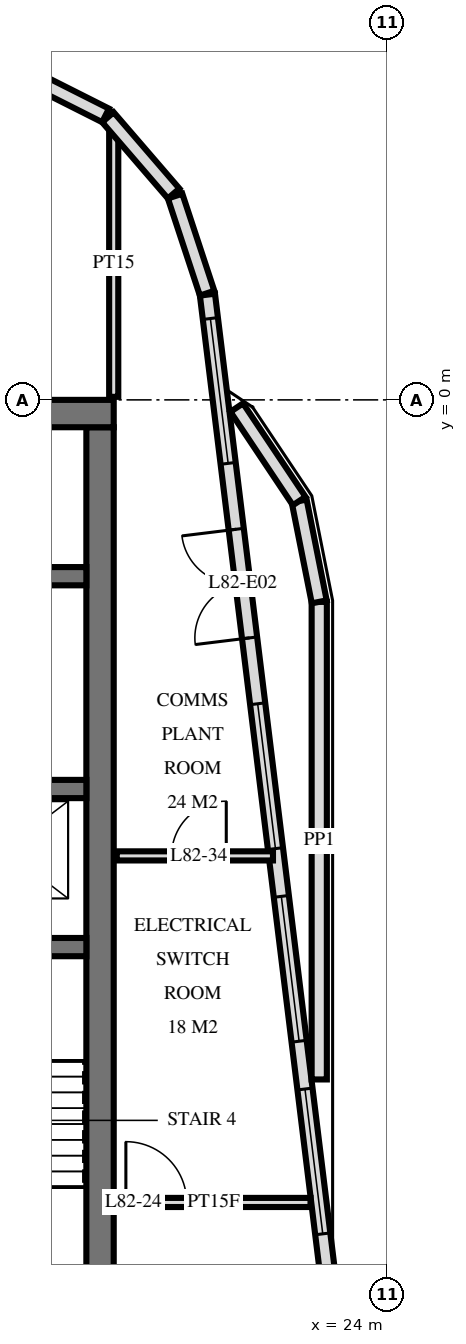
"""IFC4 building model, lengths in metres.
Left out: names, types, materials, properties, quantities, classifications, styles, units other than length and angle.
Written with IfcOpenShell. Run it as: python <this file> out.ifc"""

import sys

from ifc_helpers import new_model, si_unit, direction, frame, frame_2d, origin, place, context, subcontext, project, spatial, rectangle, extrude, element, fill, save


model = new_model("IFC4")
c1 = context("Model", 3, precision=1e-05, world=origin(), true_north=direction((0.0, 1.0)))
c2 = subcontext(c1, "Body", "Model", "MODEL_VIEW")
j1 = project(units=[si_unit("LENGTHUNIT", "METRE"), si_unit("PLANEANGLEUNIT", "RADIAN")], contexts=[c1])
p1 = place(None, origin())
s1 = spatial("IfcSite", under=j1, at=p1, CompositionType="ELEMENT")
p2 = place(p1, origin())
s2 = spatial("IfcBuilding", under=s1, at=p2, CompositionType="ELEMENT")
p3 = place(p2, frame((0.0, 0.0, 308.6)))
s3 = spatial("IfcBuildingStorey", under=s2, at=p3, CompositionType="ELEMENT", Elevation=308.6)
p4 = place(p3, frame((10.0, -0.225, 0.0), z_axis=(0.0, 0.0, 1.0), x_axis=(1.0, 0.0, 0.0)))
e1 = element("IfcWall", 1, at=p4, inside=s3, PredefinedType="SHEAR", context=c2, shape_type="SweptSolid", body=[
    extrude(rectangle(XDim=9.5, YDim=0.45, at=frame_2d((4.75, 0.0))), origin(), (0.0, 0.0, 1.0), 6.0),
])
p5 = place(p3, frame((19.275, -14.55, 0.0), z_axis=(0.0, 0.0, 1.0), x_axis=(0.0, 1.0, 0.0)))
e2 = element("IfcWall", 2, at=p5, inside=s3, PredefinedType="SHEAR", context=c2, shape_type="SweptSolid", body=[
    extrude(rectangle(XDim=14.1, YDim=0.45, at=frame_2d((7.05, 0.0))), origin(), (0.0, 0.0, 1.0), 6.0),
])
p6 = place(p3, frame((10.35, -2.9, 0.0), z_axis=(0.0, 0.0, 1.0), x_axis=(1.0, 0.0, 0.0)))
e3 = element("IfcWall", 3, at=p6, inside=s3, PredefinedType="SHEAR", context=c2, shape_type="SweptSolid", body=[
    extrude(rectangle(XDim=8.7, YDim=0.3, at=frame_2d((4.35, 0.0))), origin(), (0.0, 0.0, 1.0), 6.0),
])
p7 = place(p6, frame((0.8, 0.0, 0.0)))
e4 = element("IfcOpeningElement", 4, at=p7, cuts=e3, PredefinedType="OPENING", context=c2, shape_type="SweptSolid", body=[
    extrude(rectangle(XDim=1.1, YDim=2.1, at=frame_2d((0.55, 1.05))), frame((0.0, 0.16, 0.0), z_axis=(0.0, -1.0, 0.0), x_axis=(1.0, 0.0, 0.0)), (0.0, 0.0, 1.0), 0.32),
])
p8 = place(p6, frame((3.8, 0.0, 0.0)))
e5 = element("IfcOpeningElement", 5, at=p8, cuts=e3, PredefinedType="OPENING", context=c2, shape_type="SweptSolid", body=[
    extrude(rectangle(XDim=1.1, YDim=2.1, at=frame_2d((0.55, 1.05))), frame((0.0, 0.16, 0.0), z_axis=(0.0, -1.0, 0.0), x_axis=(1.0, 0.0, 0.0)), (0.0, 0.0, 1.0), 0.32),
])
p9 = place(p6, frame((6.9, 0.0, 0.0)))
e6 = element("IfcOpeningElement", 6, at=p9, cuts=e3, PredefinedType="OPENING", context=c2, shape_type="SweptSolid", body=[
    extrude(rectangle(XDim=0.9, YDim=2.1, at=frame_2d((0.45, 1.05))), frame((0.0, 0.16, 0.0), z_axis=(0.0, -1.0, 0.0), x_axis=(1.0, 0.0, 0.0)), (0.0, 0.0, 1.0), 0.32),
])
p10 = place(p3, frame((10.35, -6.4, 0.0), z_axis=(0.0, 0.0, 1.0), x_axis=(1.0, 0.0, 0.0)))
e7 = element("IfcWall", 7, at=p10, inside=s3, PredefinedType="SHEAR", context=c2, shape_type="SweptSolid", body=[
    extrude(rectangle(XDim=8.7, YDim=0.3, at=frame_2d((4.35, 0.0))), origin(), (0.0, 0.0, 1.0), 6.0),
])
p11 = place(p10, frame((6.8, 0.0, 0.0)))
e8 = element("IfcOpeningElement", 8, at=p11, cuts=e7, PredefinedType="OPENING", context=c2, shape_type="SweptSolid", body=[
    extrude(rectangle(XDim=1.1, YDim=2.1, at=frame_2d((0.55, 1.05))), frame((0.0, 0.16, 0.0), z_axis=(0.0, -1.0, 0.0), x_axis=(1.0, 0.0, 0.0)), (0.0, 0.0, 1.0), 0.32),
])
p12 = place(p3, frame((10.35, -9.0, 0.0), z_axis=(0.0, 0.0, 1.0), x_axis=(1.0, 0.0, 0.0)))
e9 = element("IfcWall", 9, at=p12, inside=s3, PredefinedType="SHEAR", context=c2, shape_type="SweptSolid", body=[
    extrude(rectangle(XDim=8.7, YDim=0.3, at=frame_2d((4.35, 0.0))), origin(), (0.0, 0.0, 1.0), 6.0),
])
p13 = place(p12, frame((3.8, 0.0, 0.0)))
e10 = element("IfcOpeningElement", 10, at=p13, cuts=e9, PredefinedType="OPENING", context=c2, shape_type="SweptSolid", body=[
    extrude(rectangle(XDim=1.1, YDim=2.1, at=frame_2d((0.55, 1.05))), frame((0.0, 0.16, 0.0), z_axis=(0.0, -1.0, 0.0), x_axis=(1.0, 0.0, 0.0)), (0.0, 0.0, 1.0), 0.32),
])
p14 = place(p3, frame((21.036, 1.755, 0.0), z_axis=(0.0, 0.0, 1.0), x_axis=(-0.313046160822, 0.949737911844, 0.0)))
e11 = element("IfcWall", 11, at=p14, inside=s3, PredefinedType="SOLIDWALL", context=c2, shape_type="SweptSolid", body=[
    extrude(rectangle(XDim=1.681, YDim=0.25, at=frame_2d((0.841, 0.0))), origin(), (0.0, 0.0, 1.0), 5.72),
])
for number, where, z_axis, x_axis in (
    (12, (20.485, 3.394, 0.0), (0.0, 0.0, 1.0), (-0.653, 0.758, 0.0)),
    (13, (19.366, 4.679, 0.0), (0.0, 0.0, 1.0), (-0.893, 0.45, 0.0)),
):
    element("IfcWall", number, at=place(p3, frame(where, z_axis=z_axis, x_axis=x_axis)), inside=s3, PredefinedType="SOLIDWALL", context=c2, shape_type="SweptSolid", body=[
        extrude(rectangle(XDim=1.656, YDim=0.25, at=frame_2d((0.828, 0.0))), origin(), (0.0, 0.0, 1.0), 5.72),
    ])
p15 = place(p3, frame((23.375, -17.277, 0.0), z_axis=(0.0, 0.0, 1.0), x_axis=(-0.121862878281, 0.992546945437, 0.0)))
e14 = element("IfcWall", 14, at=p15, inside=s3, PredefinedType="SOLIDWALL", context=c2, shape_type="SweptSolid", body=[
    extrude(rectangle(XDim=19.151, YDim=0.25, at=frame_2d((9.575, 0.0))), origin(), (0.0, 0.0, 1.0), 5.72),
])
p16 = place(p15, frame((0.396, 0.0, 0.858)))
e15 = element("IfcOpeningElement", 15, at=p16, cuts=e14, PredefinedType="OPENING", context=c2, shape_type="SweptSolid", body=[
    extrude(rectangle(XDim=2.4, YDim=3.6, at=frame_2d((1.2, 1.8))), frame((0.0, 0.135, 0.0), z_axis=(0.0, -1.0, 0.0), x_axis=(1.0, 0.0, 0.0)), (0.0, 0.0, 1.0), 0.27),
])
p17 = place(p15, frame((3.588, 0.0, 0.858)))
e16 = element("IfcOpeningElement", 16, at=p17, cuts=e14, PredefinedType="OPENING", context=c2, shape_type="SweptSolid", body=[
    extrude(rectangle(XDim=2.4, YDim=3.6, at=frame_2d((1.2, 1.8))), frame((0.0, 0.135, 0.0), z_axis=(0.0, -1.0, 0.0), x_axis=(1.0, 0.0, 0.0)), (0.0, 0.0, 1.0), 0.27),
])
p18 = place(p15, frame((6.78, 0.0, 0.858)))
e17 = element("IfcOpeningElement", 17, at=p18, cuts=e14, PredefinedType="OPENING", context=c2, shape_type="SweptSolid", body=[
    extrude(rectangle(XDim=2.4, YDim=3.6, at=frame_2d((1.2, 1.8))), frame((0.0, 0.135, 0.0), z_axis=(0.0, -1.0, 0.0), x_axis=(1.0, 0.0, 0.0)), (0.0, 0.0, 1.0), 0.27),
])
p19 = place(p15, frame((9.971, 0.0, 0.858)))
e18 = element("IfcOpeningElement", 18, at=p19, cuts=e14, PredefinedType="OPENING", context=c2, shape_type="SweptSolid", body=[
    extrude(rectangle(XDim=2.4, YDim=3.6, at=frame_2d((1.2, 1.8))), frame((0.0, 0.135, 0.0), z_axis=(0.0, -1.0, 0.0), x_axis=(1.0, 0.0, 0.0)), (0.0, 0.0, 1.0), 0.27),
])
p20 = place(p15, frame((13.463, 0.0, 0.0)))
e19 = element("IfcOpeningElement", 19, at=p20, cuts=e14, PredefinedType="OPENING", context=c2, shape_type="SweptSolid", body=[
    extrude(rectangle(XDim=1.8, YDim=2.4, at=frame_2d((0.9, 1.2))), frame((0.0, 0.135, 0.0), z_axis=(0.0, -1.0, 0.0), x_axis=(1.0, 0.0, 0.0)), (0.0, 0.0, 1.0), 0.27),
])
p21 = place(p15, frame((16.355, 0.0, 0.858)))
e20 = element("IfcOpeningElement", 20, at=p21, cuts=e14, PredefinedType="OPENING", context=c2, shape_type="SweptSolid", body=[
    extrude(rectangle(XDim=2.4, YDim=3.6, at=frame_2d((1.2, 1.8))), frame((0.0, 0.135, 0.0), z_axis=(0.0, -1.0, 0.0), x_axis=(1.0, 0.0, 0.0)), (0.0, 0.0, 1.0), 0.27),
])
p22 = place(p3, frame((21.523, -0.127, 0.0), z_axis=(0.0, 0.0, 1.0), x_axis=(0.555583681008, -0.831460626486, 0.0)))
e21 = element("IfcWall", 21, at=p22, inside=s3, PredefinedType="PARAPET", context=c2, shape_type="SweptSolid", body=[
    extrude(rectangle(XDim=1.849, YDim=0.25, at=frame_2d((0.924, 0.0))), origin(), (0.0, 0.0, 1.0), 1.1),
])
p23 = place(p3, frame((22.55, -1.664, 0.0), z_axis=(0.0, 0.0, 1.0), x_axis=(0.194977246893, -0.980807765668, 0.0)))
e22 = element("IfcWall", 22, at=p23, inside=s3, PredefinedType="PARAPET", context=c2, shape_type="SweptSolid", body=[
    extrude(rectangle(XDim=1.69, YDim=0.25, at=frame_2d((0.845, 0.0))), origin(), (0.0, 0.0, 1.0), 1.1),
])
p24 = place(p3, frame((22.88, -3.322, 0.0), z_axis=(0.0, 0.0, 1.0), x_axis=(0.0, -1.0, 0.0)))
e23 = element("IfcWall", 23, at=p24, inside=s3, PredefinedType="PARAPET", context=c2, shape_type="SweptSolid", body=[
    extrude(rectangle(XDim=7.855, YDim=0.25, at=frame_2d((3.928, 0.0))), origin(), (0.0, 0.0, 1.0), 1.1),
])
p25 = place(p3, frame((19.5, 0.05, 0.0), z_axis=(0.0, 0.0, 1.0), x_axis=(0.0, 1.0, 0.0)))
e24 = element("IfcWall", 24, at=p25, inside=s3, PredefinedType="PARTITIONING", context=c2, shape_type="SweptSolid", body=[
    extrude(rectangle(XDim=4.403, YDim=0.15, at=frame_2d((2.202, 0.0))), origin(), (0.0, 0.0, 1.0), 5.7),
])
p26 = place(p3, frame((19.55, -13.2, 0.0), z_axis=(0.0, 0.0, 1.0), x_axis=(1.0, 0.0, 0.0)))
e25 = element("IfcWall", 25, at=p26, inside=s3, PredefinedType="PARTITIONING", context=c2, shape_type="SweptSolid", body=[
    extrude(rectangle(XDim=3.187, YDim=0.15, at=frame_2d((1.593, 0.0))), origin(), (0.0, 0.0, 1.0), 5.7),
])
p27 = place(p26, frame((0.15, 0.0, 0.0)))
e26 = element("IfcOpeningElement", 26, at=p27, cuts=e25, PredefinedType="OPENING", context=c2, shape_type="SweptSolid", body=[
    extrude(rectangle(XDim=1.0, YDim=2.1, at=frame_2d((0.5, 1.05))), frame((0.0, 0.085, 0.0), z_axis=(0.0, -1.0, 0.0), x_axis=(1.0, 0.0, 0.0)), (0.0, 0.0, 1.0), 0.17),
])
p28 = place(p3, frame((19.55, -7.5, 0.0), z_axis=(0.0, 0.0, 1.0), x_axis=(1.0, 0.0, 0.0)))
e27 = element("IfcWall", 27, at=p28, inside=s3, PredefinedType="PARTITIONING", context=c2, shape_type="SweptSolid", body=[
    extrude(rectangle(XDim=2.569, YDim=0.15, at=frame_2d((1.285, 0.0))), origin(), (0.0, 0.0, 1.0), 5.7),
])
p29 = place(p28, frame((0.901, 0.0, 0.0)))
e28 = element("IfcOpeningElement", 28, at=p29, cuts=e27, PredefinedType="OPENING", context=c2, shape_type="SweptSolid", body=[
    extrude(rectangle(XDim=0.9, YDim=2.1, at=frame_2d((0.45, 1.05))), frame((0.0, 0.085, 0.0), z_axis=(0.0, -1.0, 0.0), x_axis=(1.0, 0.0, 0.0)), (0.0, 0.0, 1.0), 0.17),
])
p30 = place(p17, origin())
e29 = element("IfcWindow", 29, at=p30, inside=s3, PartitioningType="SINGLE_PANEL", PredefinedType="USERDEFINED", context=c2, shape_type="SweptSolid", body=[
    extrude(rectangle(XDim=2.4, YDim=3.6, at=frame_2d((1.2, 1.8))), frame((0.0, 0.125, 0.0), z_axis=(0.0, -1.0, 0.0), x_axis=(1.0, 0.0, 0.0)), (0.0, 0.0, 1.0), 0.06),
])
fill(e16, e29)
p31 = place(p18, origin())
e30 = element("IfcWindow", 30, at=p31, inside=s3, PartitioningType="SINGLE_PANEL", PredefinedType="USERDEFINED", context=c2, shape_type="SweptSolid", body=[
    extrude(rectangle(XDim=2.4, YDim=3.6, at=frame_2d((1.2, 1.8))), frame((0.0, 0.125, 0.0), z_axis=(0.0, -1.0, 0.0), x_axis=(1.0, 0.0, 0.0)), (0.0, 0.0, 1.0), 0.06),
])
fill(e17, e30)
p32 = place(p19, origin())
e31 = element("IfcWindow", 31, at=p32, inside=s3, PartitioningType="SINGLE_PANEL", PredefinedType="USERDEFINED", context=c2, shape_type="SweptSolid", body=[
    extrude(rectangle(XDim=2.4, YDim=3.6, at=frame_2d((1.2, 1.8))), frame((0.0, 0.125, 0.0), z_axis=(0.0, -1.0, 0.0), x_axis=(1.0, 0.0, 0.0)), (0.0, 0.0, 1.0), 0.06),
])
fill(e18, e31)
p33 = place(p20, origin())
e32 = element("IfcDoor", 32, at=p33, inside=s3, OperationType="DOUBLE_DOOR_SINGLE_SWING", PredefinedType="DOOR", context=c2, shape_type="SweptSolid", body=[
    extrude(rectangle(XDim=1.8, YDim=2.4, at=frame_2d((0.9, 1.2))), frame((0.0, 0.025, 0.0), z_axis=(0.0, -1.0, 0.0), x_axis=(1.0, 0.0, 0.0)), (0.0, 0.0, 1.0), 0.05),
])
fill(e19, e32)
p34 = place(p21, origin())
e33 = element("IfcWindow", 33, at=p34, inside=s3, PartitioningType="SINGLE_PANEL", PredefinedType="USERDEFINED", context=c2, shape_type="SweptSolid", body=[
    extrude(rectangle(XDim=2.4, YDim=3.6, at=frame_2d((1.2, 1.8))), frame((0.0, 0.125, 0.0), z_axis=(0.0, -1.0, 0.0), x_axis=(1.0, 0.0, 0.0)), (0.0, 0.0, 1.0), 0.06),
])
fill(e20, e33)
p35 = place(p27, origin())
e34 = element("IfcDoor", 34, at=p35, inside=s3, OperationType="SINGLE_SWING_RIGHT", PredefinedType="DOOR", context=c2, shape_type="SweptSolid", body=[
    extrude(rectangle(XDim=1.0, YDim=2.1, at=frame_2d((0.5, 1.05))), frame((0.0, 0.025, 0.0), z_axis=(0.0, -1.0, 0.0), x_axis=(1.0, 0.0, 0.0)), (0.0, 0.0, 1.0), 0.05),
])
fill(e26, e34)
p36 = place(p29, origin())
e35 = element("IfcDoor", 35, at=p36, inside=s3, OperationType="SINGLE_SWING_LEFT", PredefinedType="DOOR", context=c2, shape_type="SweptSolid", body=[
    extrude(rectangle(XDim=0.9, YDim=2.1, at=frame_2d((0.45, 1.05))), frame((0.0, 0.025, 0.0), z_axis=(0.0, -1.0, 0.0), x_axis=(1.0, 0.0, 0.0)), (0.0, 0.0, 1.0), 0.05),
])
fill(e28, e35)
save(model, sys.argv[1])
